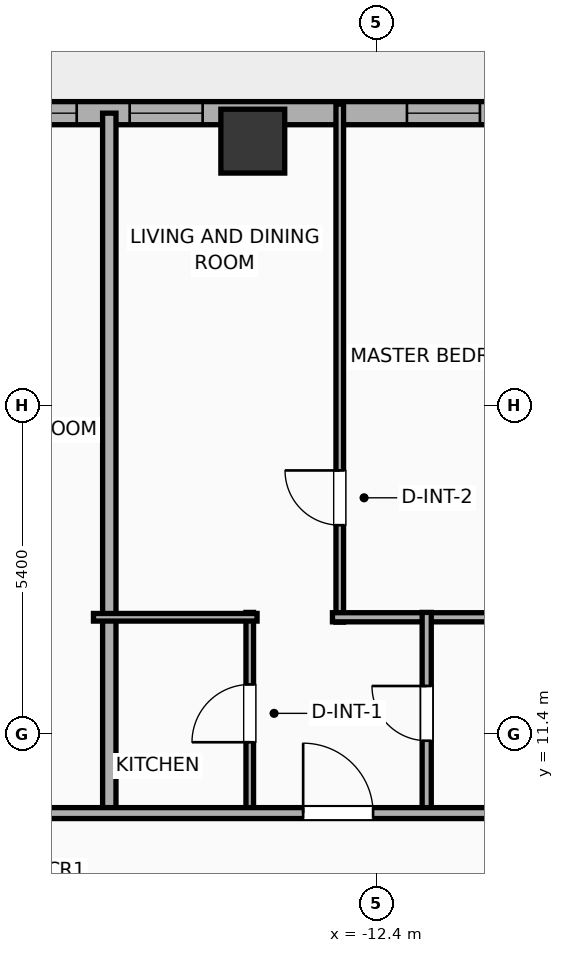
"""IFC4 building model, lengths in metres.
Left out: names, types, materials, properties, quantities, classifications, styles, units other than length and angle.
Written with IfcOpenShell. Run it as: python <this file> out.ifc"""

import sys

from ifc_helpers import new_model, si_unit, direction, frame, frame_2d, origin, origin_2d, place, context, subcontext, project, spatial, rectangle, hollow_rectangle, extrude, element, fill, save


model = new_model("IFC4")
c1 = context("Model", 3, precision=1e-05, world=origin(), true_north=direction((0.0, 1.0)))
c2 = subcontext(c1, "Body", "Model", "MODEL_VIEW")
j1 = project(units=[si_unit("LENGTHUNIT", "METRE"), si_unit("PLANEANGLEUNIT", "RADIAN")], contexts=[c1])
p1 = place(None, origin())
s1 = spatial("IfcSite", under=j1, at=p1, CompositionType="ELEMENT")
p2 = place(p1, origin())
s2 = spatial("IfcBuilding", under=s1, at=p2, CompositionType="ELEMENT")
p3 = place(p2, frame((0.0, 0.0, 113.1)))
s3 = spatial("IfcBuildingStorey", under=s2, at=p3, CompositionType="ELEMENT", Elevation=113.1)
p4 = place(p3, frame((-14.44, 21.15, 0.0), z_axis=(0.0, 0.0, 1.0), x_axis=(1.0, 0.0, 0.0)))
e1 = element("IfcColumn", 1, at=p4, inside=s3, PredefinedType="COLUMN", context=c2, shape_type="SweptSolid", body=[
    extrude(hollow_rectangle(XDim=1.05, YDim=1.05, WallThickness=0.036, at=origin_2d()), origin(), (0.0, 0.0, 1.0), 3.9),
])
p5 = place(p3, frame((-25.381, 21.61, 0.0), z_axis=(0.0, 0.0, 1.0), x_axis=(1.0, 0.0, 0.0)))
e2 = element("IfcWall", 2, at=p5, inside=s3, PredefinedType="ELEMENTEDWALL", context=c2, shape_type="SweptSolid", body=[
    extrude(rectangle(XDim=54.763, YDim=0.38, at=frame_2d((27.381, 0.0))), origin(), (0.0, 0.0, 1.0), 3.65),
])
p6 = place(p5, frame((5.645, 0.0, 0.75)))
e3 = element("IfcOpeningElement", 3, at=p6, cuts=e2, PredefinedType="OPENING", context=c2, shape_type="SweptSolid", body=[
    extrude(rectangle(XDim=2.4, YDim=2.1, at=frame_2d((1.2, 1.05))), frame((0.0, 0.2, 0.0), z_axis=(0.0, -1.0, 0.0), x_axis=(1.0, 0.0, 0.0)), (0.0, 0.0, 1.0), 0.4),
])
p7 = place(p5, frame((34.677, 0.0, 0.75)))
e4 = element("IfcOpeningElement", 4, at=p7, cuts=e2, PredefinedType="OPENING", context=c2, shape_type="SweptSolid", body=[
    extrude(rectangle(XDim=2.4, YDim=2.1, at=frame_2d((1.2, 1.05))), frame((0.0, 0.2, 0.0), z_axis=(0.0, -1.0, 0.0), x_axis=(1.0, 0.0, 0.0)), (0.0, 0.0, 1.0), 0.4),
])
p8 = place(p5, frame((45.067, 0.0, 0.75)))
e5 = element("IfcOpeningElement", 5, at=p8, cuts=e2, PredefinedType="OPENING", context=c2, shape_type="SweptSolid", body=[
    extrude(rectangle(XDim=2.4, YDim=2.1, at=frame_2d((1.2, 1.05))), frame((0.0, 0.2, 0.0), z_axis=(0.0, -1.0, 0.0), x_axis=(1.0, 0.0, 0.0)), (0.0, 0.0, 1.0), 0.4),
])
p9 = place(p5, frame((2.938, 0.0, 0.75)))
e6 = element("IfcOpeningElement", 6, at=p9, cuts=e2, PredefinedType="OPENING", context=c2, shape_type="SweptSolid", body=[
    extrude(rectangle(XDim=1.2, YDim=2.05, at=frame_2d((0.6, 1.025))), frame((0.0, 0.2, 0.0), z_axis=(0.0, -1.0, 0.0), x_axis=(1.0, 0.0, 0.0)), (0.0, 0.0, 1.0), 0.4),
])
p10 = place(p5, frame((8.916, 0.0, 0.75)))
e7 = element("IfcOpeningElement", 7, at=p10, cuts=e2, PredefinedType="OPENING", context=c2, shape_type="SweptSolid", body=[
    extrude(rectangle(XDim=1.2, YDim=2.05, at=frame_2d((0.6, 1.025))), frame((0.0, 0.2, 0.0), z_axis=(0.0, -1.0, 0.0), x_axis=(1.0, 0.0, 0.0)), (0.0, 0.0, 1.0), 0.4),
])
p11 = place(p5, frame((13.476, 0.0, 0.75)))
e8 = element("IfcOpeningElement", 8, at=p11, cuts=e2, PredefinedType="OPENING", context=c2, shape_type="SweptSolid", body=[
    extrude(rectangle(XDim=1.2, YDim=2.05, at=frame_2d((0.6, 1.025))), frame((0.0, 0.2, 0.0), z_axis=(0.0, -1.0, 0.0), x_axis=(1.0, 0.0, 0.0)), (0.0, 0.0, 1.0), 0.4),
])
p12 = place(p5, frame((17.076, 0.0, 0.75)))
e9 = element("IfcOpeningElement", 9, at=p12, cuts=e2, PredefinedType="OPENING", context=c2, shape_type="SweptSolid", body=[
    extrude(rectangle(XDim=1.2, YDim=2.05, at=frame_2d((0.6, 1.025))), frame((0.0, 0.2, 0.0), z_axis=(0.0, -1.0, 0.0), x_axis=(1.0, 0.0, 0.0)), (0.0, 0.0, 1.0), 0.4),
])
p13 = place(p5, frame((19.956, 0.0, 0.75)))
e10 = element("IfcOpeningElement", 10, at=p13, cuts=e2, PredefinedType="OPENING", context=c2, shape_type="SweptSolid", body=[
    extrude(rectangle(XDim=1.2, YDim=2.05, at=frame_2d((0.6, 1.025))), frame((0.0, 0.2, 0.0), z_axis=(0.0, -1.0, 0.0), x_axis=(1.0, 0.0, 0.0)), (0.0, 0.0, 1.0), 0.4),
])
p14 = place(p5, frame((24.276, 0.0, 0.75)))
e11 = element("IfcOpeningElement", 11, at=p14, cuts=e2, PredefinedType="OPENING", context=c2, shape_type="SweptSolid", body=[
    extrude(rectangle(XDim=1.2, YDim=2.05, at=frame_2d((0.6, 1.025))), frame((0.0, 0.2, 0.0), z_axis=(0.0, -1.0, 0.0), x_axis=(1.0, 0.0, 0.0)), (0.0, 0.0, 1.0), 0.4),
])
p15 = place(p5, frame((27.876, 0.0, 0.75)))
e12 = element("IfcOpeningElement", 12, at=p15, cuts=e2, PredefinedType="OPENING", context=c2, shape_type="SweptSolid", body=[
    extrude(rectangle(XDim=1.2, YDim=2.05, at=frame_2d((0.6, 1.025))), frame((0.0, 0.2, 0.0), z_axis=(0.0, -1.0, 0.0), x_axis=(1.0, 0.0, 0.0)), (0.0, 0.0, 1.0), 0.4),
])
p16 = place(p5, frame((30.876, 0.0, 0.75)))
e13 = element("IfcOpeningElement", 13, at=p16, cuts=e2, PredefinedType="OPENING", context=c2, shape_type="SweptSolid", body=[
    extrude(rectangle(XDim=1.2, YDim=2.05, at=frame_2d((0.6, 1.025))), frame((0.0, 0.2, 0.0), z_axis=(0.0, -1.0, 0.0), x_axis=(1.0, 0.0, 0.0)), (0.0, 0.0, 1.0), 0.4),
])
p17 = place(p5, frame((38.676, 0.0, 0.75)))
e14 = element("IfcOpeningElement", 14, at=p17, cuts=e2, PredefinedType="OPENING", context=c2, shape_type="SweptSolid", body=[
    extrude(rectangle(XDim=1.2, YDim=2.05, at=frame_2d((0.6, 1.025))), frame((0.0, 0.2, 0.0), z_axis=(0.0, -1.0, 0.0), x_axis=(1.0, 0.0, 0.0)), (0.0, 0.0, 1.0), 0.4),
])
p18 = place(p5, frame((41.796, 0.0, 0.75)))
e15 = element("IfcOpeningElement", 15, at=p18, cuts=e2, PredefinedType="OPENING", context=c2, shape_type="SweptSolid", body=[
    extrude(rectangle(XDim=1.2, YDim=2.05, at=frame_2d((0.6, 1.025))), frame((0.0, 0.2, 0.0), z_axis=(0.0, -1.0, 0.0), x_axis=(1.0, 0.0, 0.0)), (0.0, 0.0, 1.0), 0.4),
])
p19 = place(p5, frame((49.476, 0.0, 0.75)))
e16 = element("IfcOpeningElement", 16, at=p19, cuts=e2, PredefinedType="OPENING", context=c2, shape_type="SweptSolid", body=[
    extrude(rectangle(XDim=1.2, YDim=2.05, at=frame_2d((0.6, 1.025))), frame((0.0, 0.2, 0.0), z_axis=(0.0, -1.0, 0.0), x_axis=(1.0, 0.0, 0.0)), (0.0, 0.0, 1.0), 0.4),
])
p20 = place(p5, frame((52.227, 0.0, 0.75)))
e17 = element("IfcOpeningElement", 17, at=p20, cuts=e2, PredefinedType="OPENING", context=c2, shape_type="SweptSolid", body=[
    extrude(rectangle(XDim=1.2, YDim=2.05, at=frame_2d((0.6, 1.025))), frame((0.0, 0.2, 0.0), z_axis=(0.0, -1.0, 0.0), x_axis=(1.0, 0.0, 0.0)), (0.0, 0.0, 1.0), 0.4),
])
p21 = place(p3, frame((-16.8, 10.02, 0.0), z_axis=(0.0, 0.0, 1.0), x_axis=(0.0, 1.0, 0.0)))
e18 = element("IfcWall", 18, at=p21, inside=s3, PredefinedType="PARTITIONING", context=c2, shape_type="SweptSolid", body=[
    extrude(rectangle(XDim=11.59, YDim=0.22, at=frame_2d((5.795, 0.0))), origin(), (0.0, 0.0, 1.0), 3.65),
])
p22 = place(p3, frame((-13.01, 13.24, 0.0), z_axis=(0.0, 0.0, 1.0), x_axis=(0.0, 1.0, 0.0)))
e19 = element("IfcWall", 19, at=p22, inside=s3, PredefinedType="PARTITIONING", context=c2, shape_type="SweptSolid", body=[
    extrude(rectangle(XDim=8.52, YDim=0.125, at=frame_2d((4.26, 0.0))), origin(), (0.0, 0.0, 1.0), 3.65),
])
p23 = place(p22, frame((1.595, 0.0, 0.0)))
e20 = element("IfcOpeningElement", 20, at=p23, cuts=e19, PredefinedType="OPENING", context=c2, shape_type="SweptSolid", body=[
    extrude(rectangle(XDim=0.9, YDim=2.05, at=frame_2d((0.45, 1.025))), frame((0.0, 0.073, 0.0), z_axis=(0.0, -1.0, 0.0), x_axis=(1.0, 0.0, 0.0)), (0.0, 0.0, 1.0), 0.145),
])
p24 = place(p3, frame((-13.13, 13.32, 0.0), z_axis=(0.0, 0.0, 1.0), x_axis=(1.0, 0.0, 0.0)))
e21 = element("IfcWall", 21, at=p24, inside=s3, PredefinedType="PLUMBINGWALL", context=c2, shape_type="SweptSolid", body=[
    extrude(rectangle(XDim=3.605, YDim=0.15, at=frame_2d((1.802, 0.0))), origin(), (0.0, 0.0, 1.0), 3.65),
])
p25 = place(p3, frame((-14.49, 10.08, 0.0), z_axis=(0.0, 0.0, 1.0), x_axis=(0.0, 1.0, 0.0)))
e22 = element("IfcWall", 22, at=p25, inside=s3, PredefinedType="PARTITIONING", context=c2, shape_type="SweptSolid", body=[
    extrude(rectangle(XDim=3.32, YDim=0.125, at=frame_2d((1.66, 0.0))), origin(), (0.0, 0.0, 1.0), 3.65),
])
p26 = place(p25, frame((1.185, 0.0, 0.0)))
e23 = element("IfcOpeningElement", 23, at=p26, cuts=e22, PredefinedType="OPENING", context=c2, shape_type="SweptSolid", body=[
    extrude(rectangle(XDim=0.95, YDim=2.05, at=frame_2d((0.475, 1.025))), frame((0.0, 0.073, 0.0), z_axis=(0.0, -1.0, 0.0), x_axis=(1.0, 0.0, 0.0)), (0.0, 0.0, 1.0), 0.145),
])
p27 = place(p3, frame((-17.06, 13.32, 0.0), z_axis=(0.0, 0.0, 1.0), x_axis=(1.0, 0.0, 0.0)))
e24 = element("IfcWall", 24, at=p27, inside=s3, PredefinedType="PARTITIONING", context=c2, shape_type="SweptSolid", body=[
    extrude(rectangle(XDim=2.69, YDim=0.125, at=frame_2d((1.345, 0.0))), origin(), (0.0, 0.0, 1.0), 3.65),
])
p28 = place(p3, frame((-11.58, 10.08, 0.0), z_axis=(0.0, 0.0, 1.0), x_axis=(0.0, 1.0, 0.0)))
e25 = element("IfcWall", 25, at=p28, inside=s3, PredefinedType="PLUMBINGWALL", context=c2, shape_type="SweptSolid", body=[
    extrude(rectangle(XDim=3.32, YDim=0.15, at=frame_2d((1.66, 0.0))), origin(), (0.0, 0.0, 1.0), 3.65),
])
p29 = place(p28, frame((1.21, 0.0, 0.0)))
e26 = element("IfcOpeningElement", 26, at=p29, cuts=e25, PredefinedType="OPENING", context=c2, shape_type="SweptSolid", body=[
    extrude(rectangle(XDim=0.9, YDim=2.05, at=frame_2d((0.45, 1.025))), frame((0.0, 0.085, 0.0), z_axis=(0.0, -1.0, 0.0), x_axis=(1.0, 0.0, 0.0)), (0.0, 0.0, 1.0), 0.17),
])
p30 = place(p3, frame((-29.21, 10.1, 0.0), z_axis=(0.0, 0.0, 1.0), x_axis=(1.0, 0.0, 0.0)))
e27 = element("IfcWall", 27, at=p30, inside=s3, PredefinedType="PARTITIONING", context=c2, shape_type="SweptSolid", body=[
    extrude(rectangle(XDim=62.42, YDim=0.18, at=frame_2d((31.21, 0.0))), origin(), (0.0, 0.0, 1.0), 3.65),
])
p31 = place(p30, frame((2.74, 0.0, 0.0)))
e28 = element("IfcOpeningElement", 28, at=p31, cuts=e27, PredefinedType="OPENING", context=c2, shape_type="SweptSolid", body=[
    extrude(rectangle(XDim=0.9, YDim=2.05, at=frame_2d((0.45, 1.025))), frame((0.0, 0.1, 0.0), z_axis=(0.0, -1.0, 0.0), x_axis=(1.0, 0.0, 0.0)), (0.0, 0.0, 1.0), 0.2),
])
p32 = place(p30, frame((9.868, 0.0, 0.0)))
e29 = element("IfcOpeningElement", 29, at=p32, cuts=e27, PredefinedType="OPENING", context=c2, shape_type="SweptSolid", body=[
    extrude(rectangle(XDim=1.15, YDim=2.05, at=frame_2d((0.575, 1.025))), frame((0.0, 0.1, 0.0), z_axis=(0.0, -1.0, 0.0), x_axis=(1.0, 0.0, 0.0)), (0.0, 0.0, 1.0), 0.2),
])
p33 = place(p30, frame((15.598, 0.0, 0.0)))
e30 = element("IfcOpeningElement", 30, at=p33, cuts=e27, PredefinedType="OPENING", context=c2, shape_type="SweptSolid", body=[
    extrude(rectangle(XDim=1.15, YDim=2.05, at=frame_2d((0.575, 1.025))), frame((0.0, 0.1, 0.0), z_axis=(0.0, -1.0, 0.0), x_axis=(1.0, 0.0, 0.0)), (0.0, 0.0, 1.0), 0.2),
])
p34 = place(p30, frame((22.801, 0.0, 0.0)))
e31 = element("IfcOpeningElement", 31, at=p34, cuts=e27, PredefinedType="OPENING", context=c2, shape_type="SweptSolid", body=[
    extrude(rectangle(XDim=1.15, YDim=2.05, at=frame_2d((0.575, 1.025))), frame((0.0, 0.1, 0.0), z_axis=(0.0, -1.0, 0.0), x_axis=(1.0, 0.0, 0.0)), (0.0, 0.0, 1.0), 0.2),
])
p35 = place(p30, frame((29.998, 0.0, 0.0)))
e32 = element("IfcOpeningElement", 32, at=p35, cuts=e27, PredefinedType="OPENING", context=c2, shape_type="SweptSolid", body=[
    extrude(rectangle(XDim=1.15, YDim=2.05, at=frame_2d((0.575, 1.025))), frame((0.0, 0.1, 0.0), z_axis=(0.0, -1.0, 0.0), x_axis=(1.0, 0.0, 0.0)), (0.0, 0.0, 1.0), 0.2),
])
p36 = place(p30, frame((37.202, 0.0, 0.0)))
e33 = element("IfcOpeningElement", 33, at=p36, cuts=e27, PredefinedType="OPENING", context=c2, shape_type="SweptSolid", body=[
    extrude(rectangle(XDim=1.15, YDim=2.05, at=frame_2d((0.575, 1.025))), frame((0.0, 0.1, 0.0), z_axis=(0.0, -1.0, 0.0), x_axis=(1.0, 0.0, 0.0)), (0.0, 0.0, 1.0), 0.2),
])
p37 = place(p30, frame((44.399, 0.0, 0.0)))
e34 = element("IfcOpeningElement", 34, at=p37, cuts=e27, PredefinedType="OPENING", context=c2, shape_type="SweptSolid", body=[
    extrude(rectangle(XDim=1.15, YDim=2.05, at=frame_2d((0.575, 1.025))), frame((0.0, 0.1, 0.0), z_axis=(0.0, -1.0, 0.0), x_axis=(1.0, 0.0, 0.0)), (0.0, 0.0, 1.0), 0.2),
])
p38 = place(p30, frame((51.602, 0.0, 0.0)))
e35 = element("IfcOpeningElement", 35, at=p38, cuts=e27, PredefinedType="OPENING", context=c2, shape_type="SweptSolid", body=[
    extrude(rectangle(XDim=1.15, YDim=2.05, at=frame_2d((0.575, 1.025))), frame((0.0, 0.1, 0.0), z_axis=(0.0, -1.0, 0.0), x_axis=(1.0, 0.0, 0.0)), (0.0, 0.0, 1.0), 0.2),
])
p39 = place(p30, frame((58.762, 0.0, 0.0)))
e36 = element("IfcOpeningElement", 36, at=p39, cuts=e27, PredefinedType="OPENING", context=c2, shape_type="SweptSolid", body=[
    extrude(rectangle(XDim=0.9, YDim=2.05, at=frame_2d((0.45, 1.025))), frame((0.0, 0.1, 0.0), z_axis=(0.0, -1.0, 0.0), x_axis=(1.0, 0.0, 0.0)), (0.0, 0.0, 1.0), 0.2),
])
p40 = place(p6, origin())
e37 = element("IfcWindow", 37, at=p40, inside=s3, PartitioningType="SINGLE_PANEL", PredefinedType="WINDOW", context=c2, shape_type="SweptSolid", body=[
    extrude(rectangle(XDim=2.4, YDim=2.1, at=frame_2d((1.2, 1.05))), frame((0.0, 0.03, 0.0), z_axis=(0.0, -1.0, 0.0), x_axis=(1.0, 0.0, 0.0)), (0.0, 0.0, 1.0), 0.06),
])
fill(e3, e37)
p41 = place(p10, origin())
e38 = element("IfcWindow", 38, at=p41, inside=s3, PartitioningType="SINGLE_PANEL", PredefinedType="WINDOW", context=c2, shape_type="SweptSolid", body=[
    extrude(rectangle(XDim=1.2, YDim=2.05, at=frame_2d((0.6, 1.025))), frame((0.0, 0.03, 0.0), z_axis=(0.0, -1.0, 0.0), x_axis=(1.0, 0.0, 0.0)), (0.0, 0.0, 1.0), 0.06),
])
fill(e7, e38)
p42 = place(p11, origin())
e39 = element("IfcWindow", 39, at=p42, inside=s3, PartitioningType="SINGLE_PANEL", PredefinedType="WINDOW", context=c2, shape_type="SweptSolid", body=[
    extrude(rectangle(XDim=1.2, YDim=2.05, at=frame_2d((0.6, 1.025))), frame((0.0, 0.03, 0.0), z_axis=(0.0, -1.0, 0.0), x_axis=(1.0, 0.0, 0.0)), (0.0, 0.0, 1.0), 0.06),
])
fill(e8, e39)
p43 = place(p23, origin())
e40 = element("IfcDoor", 40, at=p43, inside=s3, OperationType="SINGLE_SWING_RIGHT", PredefinedType="DOOR", context=c2, shape_type="SweptSolid", body=[
    extrude(rectangle(XDim=0.9, YDim=2.05, at=frame_2d((0.45, 1.025))), frame((0.0, 0.025, 0.0), z_axis=(0.0, -1.0, 0.0), x_axis=(1.0, 0.0, 0.0)), (0.0, 0.0, 1.0), 0.05),
])
fill(e20, e40)
p44 = place(p26, origin())
e41 = element("IfcDoor", 41, at=p44, inside=s3, OperationType="SINGLE_SWING_LEFT", PredefinedType="DOOR", context=c2, shape_type="SweptSolid", body=[
    extrude(rectangle(XDim=0.95, YDim=2.05, at=frame_2d((0.475, 1.025))), frame((0.0, 0.025, 0.0), z_axis=(0.0, -1.0, 0.0), x_axis=(1.0, 0.0, 0.0)), (0.0, 0.0, 1.0), 0.05),
])
fill(e23, e41)
p45 = place(p29, origin())
e42 = element("IfcDoor", 42, at=p45, inside=s3, OperationType="SINGLE_SWING_RIGHT", PredefinedType="DOOR", context=c2, shape_type="SweptSolid", body=[
    extrude(rectangle(XDim=0.9, YDim=2.05, at=frame_2d((0.45, 1.025))), frame((0.0, 0.025, 0.0), z_axis=(0.0, -1.0, 0.0), x_axis=(1.0, 0.0, 0.0)), (0.0, 0.0, 1.0), 0.05),
])
fill(e26, e42)
p46 = place(p33, origin())
e43 = element("IfcDoor", 43, at=p46, inside=s3, OperationType="SINGLE_SWING_LEFT", PredefinedType="DOOR", context=c2, shape_type="SweptSolid", body=[
    extrude(rectangle(XDim=1.15, YDim=2.05, at=frame_2d((0.575, 1.025))), frame((0.0, 0.025, 0.0), z_axis=(0.0, -1.0, 0.0), x_axis=(1.0, 0.0, 0.0)), (0.0, 0.0, 1.0), 0.05),
])
fill(e30, e43)
save(model, sys.argv[1])
